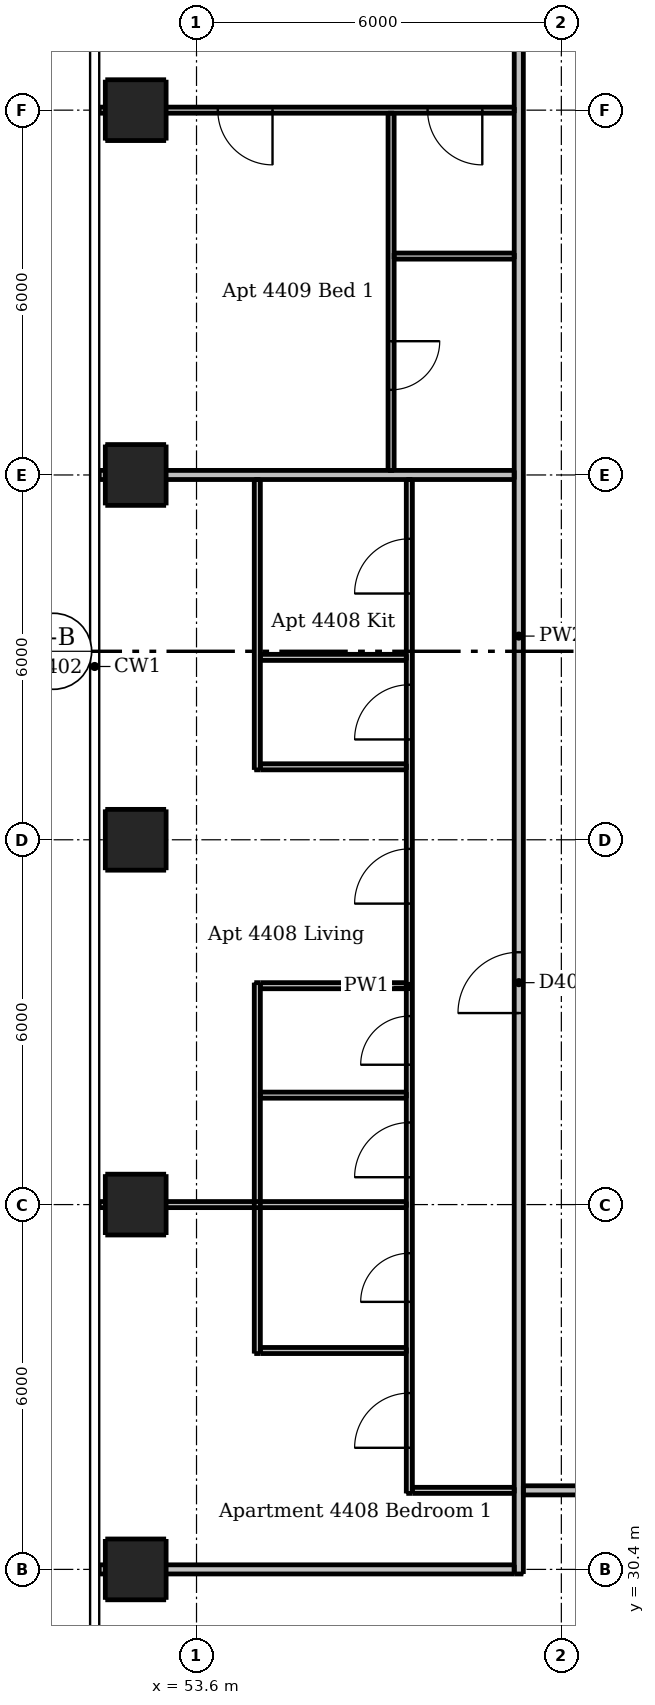
"""IFC4 building model, lengths in metres.
Left out: names, types, materials, properties, quantities, classifications, styles, units other than length and angle.
Written with IfcOpenShell. Run it as: python <this file> out.ifc"""

import sys

from ifc_helpers import new_model, si_unit, direction, frame, frame_2d, origin, origin_2d, place, context, subcontext, project, spatial, rectangle, extrude, element, fill, save


model = new_model("IFC4")
c1 = context("Model", 3, precision=1e-05, world=origin(), true_north=direction((0.0, 1.0)))
c2 = subcontext(c1, "Body", "Model", "MODEL_VIEW")
j1 = project(units=[si_unit("LENGTHUNIT", "METRE"), si_unit("PLANEANGLEUNIT", "RADIAN")], contexts=[c1])
p1 = place(None, origin())
s1 = spatial("IfcSite", under=j1, at=p1, CompositionType="ELEMENT")
p2 = place(p1, origin())
s2 = spatial("IfcBuilding", under=s1, at=p2, CompositionType="ELEMENT")
p3 = place(p2, frame((0.0, 0.0, 164.8)))
s3 = spatial("IfcBuildingStorey", under=s2, at=p3, CompositionType="ELEMENT", Elevation=164.8)
for number, where, z_axis, x_axis in (
    (1, (52.6, 30.4, 0.0), (0.0, 0.0, 1.0), (1.0, 0.0, 0.0)),
    (2, (52.6, 36.4, 0.0), (0.0, 0.0, 1.0), (1.0, 0.0, 0.0)),
    (3, (52.6, 42.4, 0.0), (0.0, 0.0, 1.0), (1.0, 0.0, 0.0)),
    (4, (52.6, 48.4, 0.0), (0.0, 0.0, 1.0), (1.0, 0.0, 0.0)),
    (5, (52.6, 54.4, 0.0), (0.0, 0.0, 1.0), (1.0, 0.0, 0.0)),
):
    element("IfcColumn", number, at=place(p3, frame(where, z_axis=z_axis, x_axis=x_axis)), inside=s3, PredefinedType="COLUMN", context=c2, shape_type="SweptSolid", body=[
        extrude(rectangle(XDim=1.0, YDim=1.0, at=origin_2d()), origin(), (0.0, 0.0, 1.0), 3.05),
    ])
p4 = place(p3, frame((54.6, 33.95, 0.0), z_axis=(0.0, 0.0, 1.0), x_axis=(0.0, 1.0, 0.0)))
e6 = element("IfcWall", 6, at=p4, inside=s3, PredefinedType="PARTITIONING", context=c2, shape_type="SweptSolid", body=[
    extrude(rectangle(XDim=6.1, YDim=0.1, at=frame_2d((3.05, 0.0))), origin(), (0.0, 0.0, 1.0), 3.05),
])
p5 = place(p3, frame((54.6, 43.55, 0.0), z_axis=(0.0, 0.0, 1.0), x_axis=(0.0, 1.0, 0.0)))
e7 = element("IfcWall", 7, at=p5, inside=s3, PredefinedType="PARTITIONING", context=c2, shape_type="SweptSolid", body=[
    extrude(rectangle(XDim=4.775, YDim=0.1, at=frame_2d((2.387, 0.0))), origin(), (0.0, 0.0, 1.0), 3.05),
])
p6 = place(p3, frame((56.8, 54.35, 0.0), z_axis=(0.0, 0.0, 1.0), x_axis=(0.0, -1.0, 0.0)))
e8 = element("IfcWall", 8, at=p6, inside=s3, PredefinedType="PARTITIONING", context=c2, shape_type="SweptSolid", body=[
    extrude(rectangle(XDim=5.875, YDim=0.1, at=frame_2d((2.938, 0.0))), origin(), (0.0, 0.0, 1.0), 3.05),
])
p7 = place(p6, frame((3.75, 0.0, 0.0)))
e9 = element("IfcOpeningElement", 9, at=p7, cuts=e8, PredefinedType="OPENING", context=c2, shape_type="SweptSolid", body=[
    extrude(rectangle(XDim=0.8, YDim=2.1, at=frame_2d((0.4, 1.05))), frame((0.0, 0.06, 0.0), z_axis=(0.0, -1.0, 0.0), x_axis=(1.0, 0.0, 0.0)), (0.0, 0.0, 1.0), 0.12),
])
p8 = place(p3, frame((57.1, 31.65, 0.0), z_axis=(0.0, 0.0, 1.0), x_axis=(0.0, 1.0, 0.0)))
e10 = element("IfcWall", 10, at=p8, inside=s3, PredefinedType="PARTITIONING", context=c2, shape_type="SweptSolid", body=[
    extrude(rectangle(XDim=16.675, YDim=0.1, at=frame_2d((8.337, 0.0))), origin(), (0.0, 0.0, 1.0), 3.05),
])
p9 = place(p8, frame((9.7, 0.0, 0.0)))
e11 = element("IfcOpeningElement", 11, at=p9, cuts=e10, PredefinedType="OPENING", context=c2, shape_type="SweptSolid", body=[
    extrude(rectangle(XDim=0.9, YDim=2.1, at=frame_2d((0.45, 1.05))), frame((0.0, 0.06, 0.0), z_axis=(0.0, -1.0, 0.0), x_axis=(1.0, 0.0, 0.0)), (0.0, 0.0, 1.0), 0.12),
])
p10 = place(p8, frame((14.8, 0.0, 0.0)))
e12 = element("IfcOpeningElement", 12, at=p10, cuts=e10, PredefinedType="OPENING", context=c2, shape_type="SweptSolid", body=[
    extrude(rectangle(XDim=0.9, YDim=2.1, at=frame_2d((0.45, 1.05))), frame((0.0, 0.06, 0.0), z_axis=(0.0, -1.0, 0.0), x_axis=(1.0, 0.0, 0.0)), (0.0, 0.0, 1.0), 0.12),
])
p11 = place(p8, frame((12.4, 0.0, 0.0)))
e13 = element("IfcOpeningElement", 13, at=p11, cuts=e10, PredefinedType="OPENING", context=c2, shape_type="SweptSolid", body=[
    extrude(rectangle(XDim=0.9, YDim=2.1, at=frame_2d((0.45, 1.05))), frame((0.0, 0.06, 0.0), z_axis=(0.0, -1.0, 0.0), x_axis=(1.0, 0.0, 0.0)), (0.0, 0.0, 1.0), 0.12),
])
p12 = place(p8, frame((5.2, 0.0, 0.0)))
e14 = element("IfcOpeningElement", 14, at=p12, cuts=e10, PredefinedType="OPENING", context=c2, shape_type="SweptSolid", body=[
    extrude(rectangle(XDim=0.9, YDim=2.1, at=frame_2d((0.45, 1.05))), frame((0.0, 0.06, 0.0), z_axis=(0.0, -1.0, 0.0), x_axis=(1.0, 0.0, 0.0)), (0.0, 0.0, 1.0), 0.12),
])
p13 = place(p8, frame((7.05, 0.0, 0.0)))
e15 = element("IfcOpeningElement", 15, at=p13, cuts=e10, PredefinedType="OPENING", context=c2, shape_type="SweptSolid", body=[
    extrude(rectangle(XDim=0.8, YDim=2.1, at=frame_2d((0.4, 1.05))), frame((0.0, 0.06, 0.0), z_axis=(0.0, -1.0, 0.0), x_axis=(1.0, 0.0, 0.0)), (0.0, 0.0, 1.0), 0.12),
])
p14 = place(p8, frame((0.75, 0.0, 0.0)))
e16 = element("IfcOpeningElement", 16, at=p14, cuts=e10, PredefinedType="OPENING", context=c2, shape_type="SweptSolid", body=[
    extrude(rectangle(XDim=0.9, YDim=2.1, at=frame_2d((0.45, 1.05))), frame((0.0, 0.06, 0.0), z_axis=(0.0, -1.0, 0.0), x_axis=(1.0, 0.0, 0.0)), (0.0, 0.0, 1.0), 0.12),
])
p15 = place(p8, frame((3.15, 0.0, 0.0)))
e17 = element("IfcOpeningElement", 17, at=p15, cuts=e10, PredefinedType="OPENING", context=c2, shape_type="SweptSolid", body=[
    extrude(rectangle(XDim=0.8, YDim=2.1, at=frame_2d((0.4, 1.05))), frame((0.0, 0.06, 0.0), z_axis=(0.0, -1.0, 0.0), x_axis=(1.0, 0.0, 0.0)), (0.0, 0.0, 1.0), 0.12),
])
p16 = place(p3, frame((58.825, 54.4, 0.0), z_axis=(0.0, 0.0, 1.0), x_axis=(-1.0, 0.0, 0.0)))
e18 = element("IfcWall", 18, at=p16, inside=s3, PredefinedType="PARTITIONING", context=c2, shape_type="SweptSolid", body=[
    extrude(rectangle(XDim=6.825, YDim=0.1, at=frame_2d((3.413, 0.0))), origin(), (0.0, 0.0, 1.0), 2.516),
])
p17 = place(p16, frame((0.525, 0.0, 0.0)))
e19 = element("IfcOpeningElement", 19, at=p17, cuts=e18, PredefinedType="OPENING", context=c2, shape_type="SweptSolid", body=[
    extrude(rectangle(XDim=0.9, YDim=2.1, at=frame_2d((0.45, 1.05))), frame((0.0, 0.06, 0.0), z_axis=(0.0, -1.0, 0.0), x_axis=(1.0, 0.0, 0.0)), (0.0, 0.0, 1.0), 0.12),
])
p18 = place(p16, frame((3.975, 0.0, 0.0)))
e20 = element("IfcOpeningElement", 20, at=p18, cuts=e18, PredefinedType="OPENING", context=c2, shape_type="SweptSolid", body=[
    extrude(rectangle(XDim=0.9, YDim=2.1, at=frame_2d((0.45, 1.05))), frame((0.0, 0.06, 0.0), z_axis=(0.0, -1.0, 0.0), x_axis=(1.0, 0.0, 0.0)), (0.0, 0.0, 1.0), 0.12),
])
p19 = place(p3, frame((56.85, 52.0, 0.0), z_axis=(0.0, 0.0, 1.0), x_axis=(1.0, 0.0, 0.0)))
e21 = element("IfcWall", 21, at=p19, inside=s3, PredefinedType="PARTITIONING", context=c2, shape_type="SweptSolid", body=[
    extrude(rectangle(XDim=1.975, YDim=0.1, at=frame_2d((0.987, 0.0))), origin(), (0.0, 0.0, 1.0), 3.05),
])
for number, where, z_axis, x_axis in (
    (22, (54.65, 45.4, 0.0), (0.0, 0.0, 1.0), (1.0, 0.0, 0.0)),
    (23, (54.65, 43.6, 0.0), (0.0, 0.0, 1.0), (1.0, 0.0, 0.0)),
    (24, (54.65, 40.0, 0.0), (0.0, 0.0, 1.0), (1.0, 0.0, 0.0)),
    (25, (54.65, 38.2, 0.0), (0.0, 0.0, 1.0), (1.0, 0.0, 0.0)),
):
    element("IfcWall", number, at=place(p3, frame(where, z_axis=z_axis, x_axis=x_axis)), inside=s3, PredefinedType="PARTITIONING", context=c2, shape_type="SweptSolid", body=[
        extrude(rectangle(XDim=2.4, YDim=0.1, at=frame_2d((1.2, 0.0))), origin(), (0.0, 0.0, 1.0), 3.05),
    ])
p20 = place(p3, frame((52.0, 36.4, 0.0), z_axis=(0.0, 0.0, 1.0), x_axis=(1.0, 0.0, 0.0)))
e26 = element("IfcWall", 26, at=p20, inside=s3, PredefinedType="PARTITIONING", context=c2, shape_type="SweptSolid", body=[
    extrude(rectangle(XDim=5.05, YDim=0.1, at=frame_2d((2.525, 0.0))), origin(), (0.0, 0.0, 1.0), 2.516),
])
p21 = place(p3, frame((54.65, 34.0, 0.0), z_axis=(0.0, 0.0, 1.0), x_axis=(1.0, 0.0, 0.0)))
e27 = element("IfcWall", 27, at=p21, inside=s3, PredefinedType="PARTITIONING", context=c2, shape_type="SweptSolid", body=[
    extrude(rectangle(XDim=2.4, YDim=0.1, at=frame_2d((1.2, 0.0))), origin(), (0.0, 0.0, 1.0), 3.05),
])
p22 = place(p3, frame((57.15, 31.7, 0.0), z_axis=(0.0, 0.0, 1.0), x_axis=(1.0, 0.0, 0.0)))
e28 = element("IfcWall", 28, at=p22, inside=s3, PredefinedType="PARTITIONING", context=c2, shape_type="SweptSolid", body=[
    extrude(rectangle(XDim=1.675, YDim=0.1, at=frame_2d((0.837, 0.0))), origin(), (0.0, 0.0, 1.0), 3.05),
])
p23 = place(p3, frame((58.9, 30.325, 0.0), z_axis=(0.0, 0.0, 1.0), x_axis=(0.0, 1.0, 0.0)))
e29 = element("IfcWall", 29, at=p23, inside=s3, PredefinedType="PARTITIONING", context=c2, shape_type="SweptSolid", body=[
    extrude(rectangle(XDim=30.85, YDim=0.15, at=frame_2d((15.425, 0.0))), origin(), (0.0, 0.0, 1.0), 3.05),
])
p24 = place(p23, frame((9.225, 0.0, 0.0)))
e30 = element("IfcOpeningElement", 30, at=p24, cuts=e29, PredefinedType="OPENING", context=c2, shape_type="SweptSolid", body=[
    extrude(rectangle(XDim=1.0, YDim=2.1, at=frame_2d((0.5, 1.05))), frame((0.0, 0.085, 0.0), z_axis=(0.0, -1.0, 0.0), x_axis=(1.0, 0.0, 0.0)), (0.0, 0.0, 1.0), 0.17),
])
p25 = place(p23, frame((26.925, 0.0, 0.0)))
e31 = element("IfcOpeningElement", 31, at=p25, cuts=e29, PredefinedType="OPENING", context=c2, shape_type="SweptSolid", body=[
    extrude(rectangle(XDim=1.0, YDim=2.1, at=frame_2d((0.5, 1.05))), frame((0.0, 0.085, 0.0), z_axis=(0.0, -1.0, 0.0), x_axis=(1.0, 0.0, 0.0)), (0.0, 0.0, 1.0), 0.17),
])
p26 = place(p3, frame((52.0, 48.4, 0.0), z_axis=(0.0, 0.0, 1.0), x_axis=(1.0, 0.0, 0.0)))
e32 = element("IfcWall", 32, at=p26, inside=s3, PredefinedType="PARTITIONING", context=c2, shape_type="SweptSolid", body=[
    extrude(rectangle(XDim=6.825, YDim=0.15, at=frame_2d((3.413, 0.0))), origin(), (0.0, 0.0, 1.0), 2.516),
])
p27 = place(p3, frame((89.525, 31.7, 0.0), z_axis=(0.0, 0.0, 1.0), x_axis=(-1.0, 0.0, 0.0)))
e33 = element("IfcWall", 33, at=p27, inside=s3, PredefinedType="PARTITIONING", context=c2, shape_type="SweptSolid", body=[
    extrude(rectangle(XDim=30.55, YDim=0.15, at=frame_2d((15.275, 0.0))), origin(), (0.0, 0.0, 1.0), 3.05),
])
p28 = place(p27, frame((28.275, 0.0, 0.0)))
e34 = element("IfcOpeningElement", 34, at=p28, cuts=e33, PredefinedType="OPENING", context=c2, shape_type="SweptSolid", body=[
    extrude(rectangle(XDim=1.0, YDim=2.1, at=frame_2d((0.5, 1.05))), frame((0.0, 0.085, 0.0), z_axis=(0.0, -1.0, 0.0), x_axis=(1.0, 0.0, 0.0)), (0.0, 0.0, 1.0), 0.17),
])
p29 = place(p27, frame((9.925, 0.0, 0.0)))
e35 = element("IfcOpeningElement", 35, at=p29, cuts=e33, PredefinedType="OPENING", context=c2, shape_type="SweptSolid", body=[
    extrude(rectangle(XDim=1.0, YDim=2.1, at=frame_2d((0.5, 1.05))), frame((0.0, 0.085, 0.0), z_axis=(0.0, -1.0, 0.0), x_axis=(1.0, 0.0, 0.0)), (0.0, 0.0, 1.0), 0.17),
])
p30 = place(p3, frame((52.0, 30.4, 0.0), z_axis=(0.0, 0.0, 1.0), x_axis=(1.0, 0.0, 0.0)))
e36 = element("IfcWall", 36, at=p30, inside=s3, PredefinedType="PARTITIONING", context=c2, shape_type="SweptSolid", body=[
    extrude(rectangle(XDim=6.825, YDim=0.15, at=frame_2d((3.413, 0.0))), origin(), (0.0, 0.0, 1.0), 2.647),
])
p31 = place(p24, origin())
e37 = element("IfcDoor", 37, at=p31, inside=s3, OperationType="SINGLE_SWING_LEFT", PredefinedType="DOOR", context=c2, shape_type="SweptSolid", body=[
    extrude(rectangle(XDim=1.0, YDim=2.1, at=frame_2d((0.5, 1.05))), frame((0.0, 0.025, 0.0), z_axis=(0.0, -1.0, 0.0), x_axis=(1.0, 0.0, 0.0)), (0.0, 0.0, 1.0), 0.05),
])
fill(e30, e37)
p32 = place(p9, origin())
e38 = element("IfcDoor", 38, at=p32, inside=s3, OperationType="SINGLE_SWING_LEFT", PredefinedType="DOOR", context=c2, shape_type="SweptSolid", body=[
    extrude(rectangle(XDim=0.9, YDim=2.1, at=frame_2d((0.45, 1.05))), frame((0.0, 0.025, 0.0), z_axis=(0.0, -1.0, 0.0), x_axis=(1.0, 0.0, 0.0)), (0.0, 0.0, 1.0), 0.05),
])
fill(e11, e38)
p33 = place(p10, origin())
e39 = element("IfcDoor", 39, at=p33, inside=s3, OperationType="SINGLE_SWING_LEFT", PredefinedType="DOOR", context=c2, shape_type="SweptSolid", body=[
    extrude(rectangle(XDim=0.9, YDim=2.1, at=frame_2d((0.45, 1.05))), frame((0.0, 0.025, 0.0), z_axis=(0.0, -1.0, 0.0), x_axis=(1.0, 0.0, 0.0)), (0.0, 0.0, 1.0), 0.05),
])
fill(e12, e39)
p34 = place(p11, origin())
e40 = element("IfcDoor", 40, at=p34, inside=s3, OperationType="SINGLE_SWING_LEFT", PredefinedType="DOOR", context=c2, shape_type="SweptSolid", body=[
    extrude(rectangle(XDim=0.9, YDim=2.1, at=frame_2d((0.45, 1.05))), frame((0.0, 0.025, 0.0), z_axis=(0.0, -1.0, 0.0), x_axis=(1.0, 0.0, 0.0)), (0.0, 0.0, 1.0), 0.05),
])
fill(e13, e40)
p35 = place(p12, origin())
e41 = element("IfcDoor", 41, at=p35, inside=s3, OperationType="SINGLE_SWING_LEFT", PredefinedType="DOOR", context=c2, shape_type="SweptSolid", body=[
    extrude(rectangle(XDim=0.9, YDim=2.1, at=frame_2d((0.45, 1.05))), frame((0.0, 0.025, 0.0), z_axis=(0.0, -1.0, 0.0), x_axis=(1.0, 0.0, 0.0)), (0.0, 0.0, 1.0), 0.05),
])
fill(e14, e41)
p36 = place(p13, origin())
e42 = element("IfcDoor", 42, at=p36, inside=s3, OperationType="SINGLE_SWING_LEFT", PredefinedType="DOOR", context=c2, shape_type="SweptSolid", body=[
    extrude(rectangle(XDim=0.8, YDim=2.1, at=frame_2d((0.4, 1.05))), frame((0.0, 0.025, 0.0), z_axis=(0.0, -1.0, 0.0), x_axis=(1.0, 0.0, 0.0)), (0.0, 0.0, 1.0), 0.05),
])
fill(e15, e42)
p37 = place(p14, origin())
e43 = element("IfcDoor", 43, at=p37, inside=s3, OperationType="SINGLE_SWING_LEFT", PredefinedType="DOOR", context=c2, shape_type="SweptSolid", body=[
    extrude(rectangle(XDim=0.9, YDim=2.1, at=frame_2d((0.45, 1.05))), frame((0.0, 0.025, 0.0), z_axis=(0.0, -1.0, 0.0), x_axis=(1.0, 0.0, 0.0)), (0.0, 0.0, 1.0), 0.05),
])
fill(e16, e43)
p38 = place(p15, origin())
e44 = element("IfcDoor", 44, at=p38, inside=s3, OperationType="SINGLE_SWING_LEFT", PredefinedType="DOOR", context=c2, shape_type="SweptSolid", body=[
    extrude(rectangle(XDim=0.8, YDim=2.1, at=frame_2d((0.4, 1.05))), frame((0.0, 0.025, 0.0), z_axis=(0.0, -1.0, 0.0), x_axis=(1.0, 0.0, 0.0)), (0.0, 0.0, 1.0), 0.05),
])
fill(e17, e44)
p39 = place(p17, origin())
e45 = element("IfcDoor", 45, at=p39, inside=s3, OperationType="SINGLE_SWING_LEFT", PredefinedType="DOOR", context=c2, shape_type="SweptSolid", body=[
    extrude(rectangle(XDim=0.9, YDim=2.1, at=frame_2d((0.45, 1.05))), frame((0.0, 0.025, 0.0), z_axis=(0.0, -1.0, 0.0), x_axis=(1.0, 0.0, 0.0)), (0.0, 0.0, 1.0), 0.05),
])
fill(e19, e45)
p40 = place(p18, origin())
e46 = element("IfcDoor", 46, at=p40, inside=s3, OperationType="SINGLE_SWING_LEFT", PredefinedType="DOOR", context=c2, shape_type="SweptSolid", body=[
    extrude(rectangle(XDim=0.9, YDim=2.1, at=frame_2d((0.45, 1.05))), frame((0.0, 0.025, 0.0), z_axis=(0.0, -1.0, 0.0), x_axis=(1.0, 0.0, 0.0)), (0.0, 0.0, 1.0), 0.05),
])
fill(e20, e46)
p41 = place(p7, origin())
e47 = element("IfcDoor", 47, at=p41, inside=s3, OperationType="SINGLE_SWING_LEFT", PredefinedType="DOOR", context=c2, shape_type="SweptSolid", body=[
    extrude(rectangle(XDim=0.8, YDim=2.1, at=frame_2d((0.4, 1.05))), frame((0.0, 0.025, 0.0), z_axis=(0.0, -1.0, 0.0), x_axis=(1.0, 0.0, 0.0)), (0.0, 0.0, 1.0), 0.05),
])
fill(e9, e47)
save(model, sys.argv[1])
